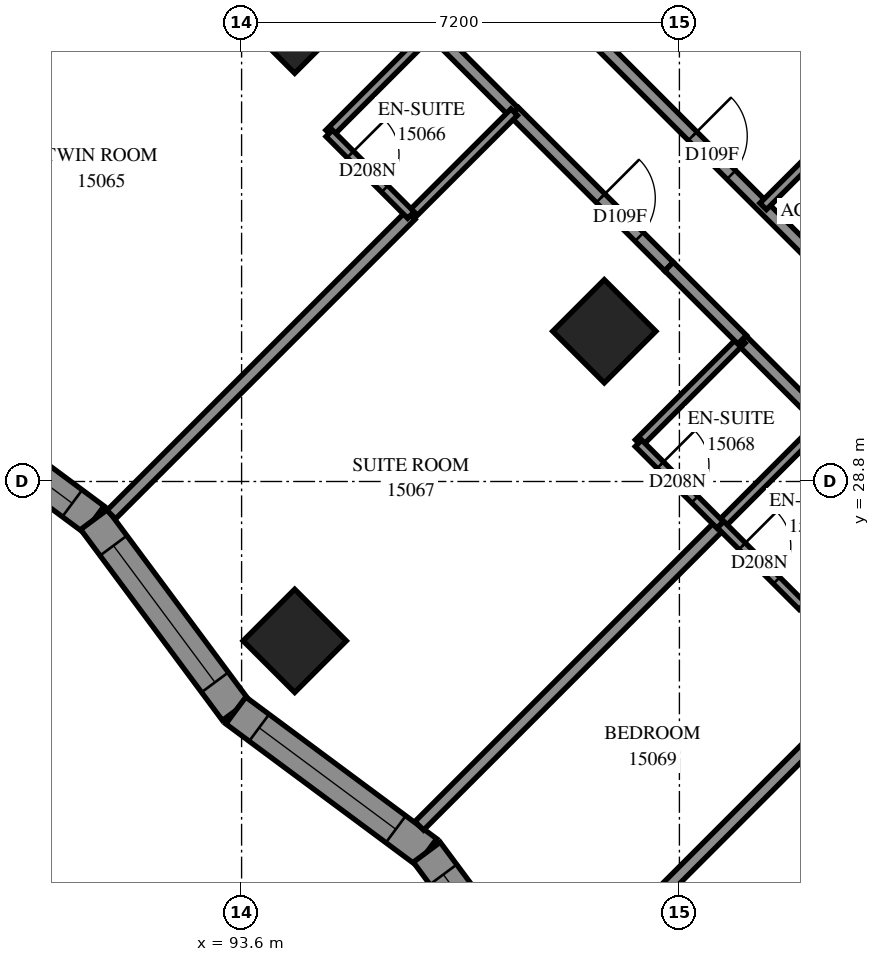
"""IFC4 building model, lengths in metres.
Left out: names, types, materials, properties, quantities, classifications, styles, units other than length and angle.
Written with IfcOpenShell. Run it as: python <this file> out.ifc"""

import sys

from ifc_helpers import new_model, si_unit, direction, frame, frame_2d, origin, origin_2d, place, context, subcontext, project, spatial, polyline, rectangle, outline, extrude, element, fill, save


model = new_model("IFC4")
c1 = context("Model", 3, precision=1e-05, world=origin(), true_north=direction((0.0, 1.0)))
c2 = subcontext(c1, "Body", "Model", "MODEL_VIEW")
j1 = project(units=[si_unit("LENGTHUNIT", "METRE"), si_unit("PLANEANGLEUNIT", "RADIAN")], contexts=[c1])
p1 = place(None, origin())
s1 = spatial("IfcSite", under=j1, at=p1, CompositionType="ELEMENT")
p2 = place(p1, origin())
s2 = spatial("IfcBuilding", under=s1, at=p2, CompositionType="ELEMENT")
p3 = place(p2, frame((0.0, 0.0, 57.6)))
s3 = spatial("IfcBuildingStorey", under=s2, at=p3, CompositionType="ELEMENT", Elevation=57.6)
for number, where, z_axis, x_axis in (
    (1, (94.474, 36.362, 0.0), (0.0, 0.0, 1.0), (0.707, -0.707, 0.0)),
    (2, (99.565, 31.271, 0.0), (0.0, 0.0, 1.0), (0.707, -0.707, 0.0)),
    (3, (94.474, 26.18, 0.0), (0.0, 0.0, 1.0), (0.707, -0.707, 0.0)),
):
    element("IfcColumn", number, at=place(p3, frame(where, z_axis=z_axis, x_axis=x_axis)), inside=s3, PredefinedType="COLUMN", context=c2, shape_type="SweptSolid", body=[
        extrude(rectangle(XDim=1.2, YDim=1.2, at=origin_2d()), origin(), (0.0, 0.0, 1.0), 3.1),
    ])
p4 = place(p3, frame((88.034, 30.506, 0.0), z_axis=(0.0, 0.0, 1.0), x_axis=(0.8029298561, -0.5960735241, 0.0)))
e4 = element("IfcWall", 4, at=p4, inside=s3, PredefinedType="SOLIDWALL", context=c2, shape_type="SweptSolid", body=[
    extrude(outline(polyline([(-0.041, -0.275), (3.87, -0.275), (3.951, 0.275), (0.041, 0.275), (-0.041, -0.275)])), origin(), (0.0, 0.0, 1.0), 3.1),
])
p5 = place(p4, frame((0.664, 0.0, 0.5)))
e5 = element("IfcOpeningElement", 5, at=p5, cuts=e4, PredefinedType="OPENING", context=c2, shape_type="SweptSolid", body=[
    extrude(rectangle(XDim=2.8, YDim=2.45, at=frame_2d((1.4, 1.225))), frame((0.0, 0.285, 0.0), z_axis=(0.0, -1.0, 0.0), x_axis=(1.0, 0.0, 0.0)), (0.0, 0.0, 1.0), 0.57),
])
p6 = place(p3, frame((91.174, 28.175, 0.0), z_axis=(0.0, 0.0, 1.0), x_axis=(0.5960692771, -0.8029330089, 0.0)))
e6 = element("IfcWall", 6, at=p6, inside=s3, PredefinedType="SOLIDWALL", context=c2, shape_type="SweptSolid", body=[
    extrude(outline(polyline([(0.041, -0.275), (3.951, -0.275), (3.87, 0.275), (-0.041, 0.275), (0.041, -0.275)])), origin(), (0.0, 0.0, 1.0), 3.1),
])
p7 = place(p6, frame((0.535, 0.0, 0.5)))
e7 = element("IfcOpeningElement", 7, at=p7, cuts=e6, PredefinedType="OPENING", context=c2, shape_type="SweptSolid", body=[
    extrude(rectangle(XDim=2.8, YDim=2.45, at=frame_2d((1.4, 1.225))), frame((0.0, 0.285, 0.0), z_axis=(0.0, -1.0, 0.0), x_axis=(1.0, 0.0, 0.0)), (0.0, 0.0, 1.0), 0.57),
])
p8 = place(p3, frame((93.505, 25.035, 0.0), z_axis=(0.0, 0.0, 1.0), x_axis=(0.8029298561, -0.5960735241, 0.0)))
e8 = element("IfcWall", 8, at=p8, inside=s3, PredefinedType="SOLIDWALL", context=c2, shape_type="SweptSolid", body=[
    extrude(outline(polyline([(-0.041, -0.275), (3.87, -0.275), (3.951, 0.275), (0.041, 0.275), (-0.041, -0.275)])), origin(), (0.0, 0.0, 1.0), 3.1),
])
p9 = place(p8, frame((0.477, 0.0, 0.5)))
e9 = element("IfcOpeningElement", 9, at=p9, cuts=e8, PredefinedType="OPENING", context=c2, shape_type="SweptSolid", body=[
    extrude(rectangle(XDim=2.8, YDim=2.45, at=frame_2d((1.4, 1.225))), frame((0.0, 0.285, 0.0), z_axis=(0.0, -1.0, 0.0), x_axis=(1.0, 0.0, 0.0)), (0.0, 0.0, 1.0), 0.57),
])
p10 = place(p3, frame((96.645, 22.704, 0.0), z_axis=(0.0, 0.0, 1.0), x_axis=(0.5960735241, -0.8029298561, 0.0)))
e10 = element("IfcWall", 10, at=p10, inside=s3, PredefinedType="SOLIDWALL", context=c2, shape_type="SweptSolid", body=[
    extrude(outline(polyline([(0.041, -0.275), (3.951, -0.275), (3.87, 0.275), (-0.041, 0.275), (0.041, -0.275)])), origin(), (0.0, 0.0, 1.0), 3.1),
])
p11 = place(p10, frame((0.456, 0.0, 0.7)))
e11 = element("IfcOpeningElement", 11, at=p11, cuts=e10, PredefinedType="OPENING", context=c2, shape_type="SweptSolid", body=[
    extrude(rectangle(XDim=1.8, YDim=2.2, at=frame_2d((0.9, 1.1))), frame((0.0, 0.285, 0.0), z_axis=(0.0, -1.0, 0.0), x_axis=(1.0, 0.0, 0.0)), (0.0, 0.0, 1.0), 0.57),
])
p12 = place(p3, frame((101.825, 31.125, 0.0), z_axis=(0.0, 0.0, 1.0), x_axis=(0.7071067812, -0.7071067812, 0.0)))
e12 = element("IfcWall", 12, at=p12, inside=s3, PredefinedType="PARTITIONING", context=c2, shape_type="SweptSolid", body=[
    extrude(rectangle(XDim=12.7, YDim=0.2, at=frame_2d((6.35, 0.0))), origin(), (0.0, 0.0, 1.0), 3.1),
])
p13 = place(p12, frame((3.895, 0.0, 0.0)))
e13 = element("IfcOpeningElement", 13, at=p13, cuts=e12, PredefinedType="OPENING", context=c2, shape_type="SweptSolid", body=[
    extrude(rectangle(XDim=0.9, YDim=2.1, at=frame_2d((0.45, 1.05))), frame((0.0, 0.11, 0.0), z_axis=(0.0, -1.0, 0.0), x_axis=(1.0, 0.0, 0.0)), (0.0, 0.0, 1.0), 0.22),
])
p14 = place(p12, frame((9.056, 0.0, 0.0)))
e14 = element("IfcOpeningElement", 14, at=p14, cuts=e12, PredefinedType="OPENING", context=c2, shape_type="SweptSolid", body=[
    extrude(rectangle(XDim=1.0, YDim=2.1, at=frame_2d((0.5, 1.05))), frame((0.0, 0.11, 0.0), z_axis=(0.0, -1.0, 0.0), x_axis=(1.0, 0.0, 0.0)), (0.0, 0.0, 1.0), 0.22),
])
p15 = place(p3, frame((86.314, 33.285, 0.0), z_axis=(0.0, 0.0, 1.0), x_axis=(0.7069956063, 0.7072179386, 0.0)))
e15 = element("IfcWall", 15, at=p15, inside=s3, PredefinedType="PARTITIONING", context=c2, shape_type="SweptSolid", body=[
    extrude(rectangle(XDim=9.445, YDim=0.2, at=frame_2d((4.723, 0.0))), origin(), (0.0, 0.0, 1.0), 3.1),
])
p16 = place(p3, frame((92.349, 40.601, 0.0), z_axis=(0.0, 0.0, 1.0), x_axis=(0.7071067812, -0.7071067812, 0.0)))
e16 = element("IfcWall", 16, at=p16, inside=s3, PredefinedType="PARTITIONING", context=c2, shape_type="SweptSolid", body=[
    extrude(rectangle(XDim=8.101, YDim=0.2, at=frame_2d((4.05, 0.0))), origin(), (0.0, 0.0, 1.0), 3.1),
])
p17 = place(p16, frame((2.909, 0.0, 0.0)))
e17 = element("IfcOpeningElement", 17, at=p17, cuts=e16, PredefinedType="OPENING", context=c2, shape_type="SweptSolid", body=[
    extrude(rectangle(XDim=0.9, YDim=2.1, at=frame_2d((0.45, 1.05))), frame((0.0, 0.11, 0.0), z_axis=(0.0, -1.0, 0.0), x_axis=(1.0, 0.0, 0.0)), (0.0, 0.0, 1.0), 0.22),
])
p18 = place(p3, frame((86.836, 35.372, 0.0), z_axis=(0.0, 0.0, 1.0), x_axis=(0.7071067812, 0.7071067812, 0.0)))
e18 = element("IfcWall", 18, at=p18, inside=s3, PredefinedType="PARTITIONING", context=c2, shape_type="SweptSolid", body=[
    extrude(rectangle(XDim=7.6, YDim=0.2, at=frame_2d((3.8, 0.0))), origin(), (0.0, 0.0, 1.0), 3.1),
])
p19 = place(p18, frame((6.342, 0.0, 0.0)))
e19 = element("IfcOpeningElement", 19, at=p19, cuts=e18, PredefinedType="OPENING", context=c2, shape_type="SweptSolid", body=[
    extrude(rectangle(XDim=1.0, YDim=2.1, at=frame_2d((0.5, 1.05))), frame((0.0, 0.11, 0.0), z_axis=(0.0, -1.0, 0.0), x_axis=(1.0, 0.0, 0.0)), (0.0, 0.0, 1.0), 0.22),
])
p20 = place(p3, frame((99.349, 36.147, 0.0), z_axis=(0.0, 0.0, 1.0), x_axis=(0.7071067812, -0.7071067812, 0.0)))
e20 = element("IfcWall", 20, at=p20, inside=s3, PredefinedType="PARTITIONING", context=c2, shape_type="SweptSolid", body=[
    extrude(rectangle(XDim=7.201, YDim=0.2, at=frame_2d((3.601, 0.0))), origin(), (0.0, 0.0, 1.0), 3.1),
])
p21 = place(p20, frame((2.358, 0.0, 0.0)))
e21 = element("IfcOpeningElement", 21, at=p21, cuts=e20, PredefinedType="OPENING", context=c2, shape_type="SweptSolid", body=[
    extrude(rectangle(XDim=0.9, YDim=2.1, at=frame_2d((0.45, 1.05))), frame((0.0, 0.11, 0.0), z_axis=(0.0, -1.0, 0.0), x_axis=(1.0, 0.0, 0.0)), (0.0, 0.0, 1.0), 0.22),
])
p22 = place(p3, frame((96.522, 23.138, 0.0), z_axis=(0.0, 0.0, 1.0), x_axis=(0.707113922, 0.7070996403, 0.0)))
e22 = element("IfcWall", 22, at=p22, inside=s3, PredefinedType="PARTITIONING", context=c2, shape_type="SweptSolid", body=[
    extrude(rectangle(XDim=7.002, YDim=0.2, at=frame_2d((3.501, 0.0))), origin(), (0.0, 0.0, 1.0), 3.1),
])
p23 = place(p3, frame((91.457, 28.256, 0.0), z_axis=(0.0, 0.0, 1.0), x_axis=(0.7071067812, 0.7071067812, 0.0)))
e23 = element("IfcWall", 23, at=p23, inside=s3, PredefinedType="PARTITIONING", context=c2, shape_type="SweptSolid", body=[
    extrude(rectangle(XDim=6.965, YDim=0.2, at=frame_2d((3.482, 0.0))), origin(), (0.0, 0.0, 1.0), 3.1),
])
p24 = place(p3, frame((100.163, 21.689, 0.0), z_axis=(0.0, 0.0, 1.0), x_axis=(0.7071067812, 0.7071067812, 0.0)))
e24 = element("IfcWall", 24, at=p24, inside=s3, PredefinedType="PARTITIONING", context=c2, shape_type="SweptSolid", body=[
    extrude(rectangle(XDim=5.504, YDim=0.2, at=frame_2d((2.752, 0.0))), origin(), (0.0, 0.0, 1.0), 3.1),
])
p25 = place(p3, frame((98.082, 34.879, 0.0), z_axis=(0.0, 0.0, 1.0), x_axis=(0.7073845681, -0.7068288851, 0.0)))
e25 = element("IfcWall", 25, at=p25, inside=s3, PredefinedType="PARTITIONING", context=c2, shape_type="SweptSolid", body=[
    extrude(rectangle(XDim=3.599, YDim=0.2, at=frame_2d((1.8, 0.0))), origin(), (0.0, 0.0, 1.0), 3.1),
])
p26 = place(p25, frame((2.009, 0.0, 0.0)))
e26 = element("IfcOpeningElement", 26, at=p26, cuts=e25, PredefinedType="OPENING", context=c2, shape_type="SweptSolid", body=[
    extrude(rectangle(XDim=0.9, YDim=2.1, at=frame_2d((0.45, 1.05))), frame((0.0, 0.11, 0.0), z_axis=(0.0, -1.0, 0.0), x_axis=(1.0, 0.0, 0.0)), (0.0, 0.0, 1.0), 0.22),
])
p27 = place(p3, frame((100.129, 29.433, 0.0), z_axis=(0.0, 0.0, 1.0), x_axis=(0.7071067812, 0.7071067812, 0.0)))
e27 = element("IfcWall", 27, at=p27, inside=s3, PredefinedType="PARTITIONING", context=c2, shape_type="SweptSolid", body=[
    extrude(rectangle(XDim=2.401, YDim=0.15, at=frame_2d((1.201, 0.0))), origin(), (0.0, 0.0, 1.0), 3.1),
])
for number, where, z_axis, x_axis in (
    (28, (96.384, 33.178, 0.0), (0.0, 0.0, 1.0), (0.708, 0.707, 0.0)),
    (29, (101.477, 28.085, 0.0), (0.0, 0.0, 1.0), (0.707, 0.708, 0.0)),
    (30, (102.177, 33.325, 0.0), (0.0, 0.0, 1.0), (0.708, 0.707, 0.0)),
):
    element("IfcWall", number, at=place(p3, frame(where, z_axis=z_axis, x_axis=x_axis)), inside=s3, PredefinedType="PARTITIONING", context=c2, shape_type="SweptSolid", body=[
        extrude(rectangle(XDim=2.4, YDim=0.15, at=frame_2d((1.2, 0.0))), origin(), (0.0, 0.0, 1.0), 3.1),
    ])
for number, where, z_axis, x_axis in (
    (31, (95.039, 34.525, 0.0), (0.0, 0.0, 1.0), (0.707, 0.707, 0.0)),
    (32, (102.817, 26.747, 0.0), (0.0, 0.0, 1.0), (0.707, 0.707, 0.0)),
):
    element("IfcWall", number, at=place(p3, frame(where, z_axis=z_axis, x_axis=x_axis)), inside=s3, PredefinedType="PARTITIONING", context=c2, shape_type="SweptSolid", body=[
        extrude(rectangle(XDim=2.398, YDim=0.15, at=frame_2d((1.199, 0.0))), origin(), (0.0, 0.0, 1.0), 3.1),
    ])
p28 = place(p3, frame((100.127, 29.429, 0.0), z_axis=(0.0, 0.0, 1.0), x_axis=(0.7071067812, -0.7071067812, 0.0)))
e33 = element("IfcWall", 33, at=p28, inside=s3, PredefinedType="PARTITIONING", context=c2, shape_type="SweptSolid", body=[
    extrude(rectangle(XDim=1.901, YDim=0.15, at=frame_2d((0.95, 0.0))), origin(), (0.0, 0.0, 1.0), 3.1),
])
p29 = place(p28, frame((0.508, 0.0, 0.0)))
e34 = element("IfcOpeningElement", 34, at=p29, cuts=e33, PredefinedType="OPENING", context=c2, shape_type="SweptSolid", body=[
    extrude(rectangle(XDim=0.8, YDim=2.1, at=frame_2d((0.4, 1.05))), frame((0.0, 0.085, 0.0), z_axis=(0.0, -1.0, 0.0), x_axis=(1.0, 0.0, 0.0)), (0.0, 0.0, 1.0), 0.17),
])
p30 = place(p3, frame((95.042, 34.526, 0.0), z_axis=(0.0, 0.0, 1.0), x_axis=(0.7065800724, -0.7076330979, 0.0)))
e35 = element("IfcWall", 35, at=p30, inside=s3, PredefinedType="PARTITIONING", context=c2, shape_type="SweptSolid", body=[
    extrude(rectangle(XDim=1.899, YDim=0.15, at=frame_2d((0.95, 0.0))), origin(), (0.0, 0.0, 1.0), 3.1),
])
p31 = place(p30, frame((0.491, 0.0, 0.0)))
e36 = element("IfcOpeningElement", 36, at=p31, cuts=e35, PredefinedType="OPENING", context=c2, shape_type="SweptSolid", body=[
    extrude(rectangle(XDim=0.8, YDim=2.1, at=frame_2d((0.4, 1.05))), frame((0.0, 0.085, 0.0), z_axis=(0.0, -1.0, 0.0), x_axis=(1.0, 0.0, 0.0)), (0.0, 0.0, 1.0), 0.17),
])
p32 = place(p3, frame((101.477, 28.091, 0.0), z_axis=(0.0, 0.0, 1.0), x_axis=(0.7076330979, -0.7065800724, 0.0)))
e37 = element("IfcWall", 37, at=p32, inside=s3, PredefinedType="PARTITIONING", context=c2, shape_type="SweptSolid", body=[
    extrude(rectangle(XDim=1.899, YDim=0.15, at=frame_2d((0.95, 0.0))), origin(), (0.0, 0.0, 1.0), 3.1),
])
p33 = place(p32, frame((0.501, 0.0, 0.0)))
e38 = element("IfcOpeningElement", 38, at=p33, cuts=e37, PredefinedType="OPENING", context=c2, shape_type="SweptSolid", body=[
    extrude(rectangle(XDim=0.8, YDim=2.1, at=frame_2d((0.4, 1.05))), frame((0.0, 0.085, 0.0), z_axis=(0.0, -1.0, 0.0), x_axis=(1.0, 0.0, 0.0)), (0.0, 0.0, 1.0), 0.17),
])
p34 = place(p3, frame((100.629, 32.335, 0.0), z_axis=(0.0, 0.0, 1.0), x_axis=(0.7071067812, -0.7071067812, 0.0)))
e39 = element("IfcWall", 39, at=p34, inside=s3, PredefinedType="PARTITIONING", context=c2, shape_type="SweptSolid", body=[
    extrude(rectangle(XDim=1.7, YDim=0.2, at=frame_2d((0.85, 0.0))), origin(), (0.0, 0.0, 1.0), 3.1),
])
p35 = place(p5, origin())
e40 = element("IfcWindow", 40, at=p35, inside=s3, PartitioningType="SINGLE_PANEL", PredefinedType="WINDOW", context=c2, shape_type="SweptSolid", body=[
    extrude(rectangle(XDim=2.8, YDim=2.45, at=frame_2d((1.4, 1.225))), frame((0.0, 0.155, 0.0), z_axis=(0.0, -1.0, 0.0), x_axis=(1.0, 0.0, 0.0)), (0.0, 0.0, 1.0), 0.06),
])
fill(e5, e40)
p36 = place(p7, origin())
e41 = element("IfcWindow", 41, at=p36, inside=s3, PartitioningType="SINGLE_PANEL", PredefinedType="WINDOW", context=c2, shape_type="SweptSolid", body=[
    extrude(rectangle(XDim=2.8, YDim=2.45, at=frame_2d((1.4, 1.225))), frame((0.0, 0.155, 0.0), z_axis=(0.0, -1.0, 0.0), x_axis=(1.0, 0.0, 0.0)), (0.0, 0.0, 1.0), 0.06),
])
fill(e7, e41)
p37 = place(p9, origin())
e42 = element("IfcWindow", 42, at=p37, inside=s3, PartitioningType="SINGLE_PANEL", PredefinedType="WINDOW", context=c2, shape_type="SweptSolid", body=[
    extrude(rectangle(XDim=2.8, YDim=2.45, at=frame_2d((1.4, 1.225))), frame((0.0, 0.155, 0.0), z_axis=(0.0, -1.0, 0.0), x_axis=(1.0, 0.0, 0.0)), (0.0, 0.0, 1.0), 0.06),
])
fill(e9, e42)
p38 = place(p21, origin())
e43 = element("IfcDoor", 43, at=p38, inside=s3, OperationType="SINGLE_SWING_RIGHT", PredefinedType="DOOR", context=c2, shape_type="SweptSolid", body=[
    extrude(rectangle(XDim=0.9, YDim=2.1, at=frame_2d((0.45, 1.05))), frame((0.0, 0.025, 0.0), z_axis=(0.0, -1.0, 0.0), x_axis=(1.0, 0.0, 0.0)), (0.0, 0.0, 1.0), 0.05),
])
fill(e21, e43)
p39 = place(p31, origin())
e44 = element("IfcDoor", 44, at=p39, inside=s3, OperationType="SINGLE_SWING_RIGHT", PredefinedType="DOOR", context=c2, shape_type="SweptSolid", body=[
    extrude(rectangle(XDim=0.8, YDim=2.1, at=frame_2d((0.4, 1.05))), frame((0.0, 0.025, 0.0), z_axis=(0.0, -1.0, 0.0), x_axis=(1.0, 0.0, 0.0)), (0.0, 0.0, 1.0), 0.05),
])
fill(e36, e44)
p40 = place(p26, origin())
e45 = element("IfcDoor", 45, at=p40, inside=s3, OperationType="SINGLE_SWING_LEFT", PredefinedType="DOOR", context=c2, shape_type="SweptSolid", body=[
    extrude(rectangle(XDim=0.9, YDim=2.1, at=frame_2d((0.45, 1.05))), frame((0.0, 0.025, 0.0), z_axis=(0.0, -1.0, 0.0), x_axis=(1.0, 0.0, 0.0)), (0.0, 0.0, 1.0), 0.05),
])
fill(e26, e45)
p41 = place(p29, origin())
e46 = element("IfcDoor", 46, at=p41, inside=s3, OperationType="SINGLE_SWING_RIGHT", PredefinedType="DOOR", context=c2, shape_type="SweptSolid", body=[
    extrude(rectangle(XDim=0.8, YDim=2.1, at=frame_2d((0.4, 1.05))), frame((0.0, 0.025, 0.0), z_axis=(0.0, -1.0, 0.0), x_axis=(1.0, 0.0, 0.0)), (0.0, 0.0, 1.0), 0.05),
])
fill(e34, e46)
p42 = place(p33, origin())
e47 = element("IfcDoor", 47, at=p42, inside=s3, OperationType="SINGLE_SWING_RIGHT", PredefinedType="DOOR", context=c2, shape_type="SweptSolid", body=[
    extrude(rectangle(XDim=0.8, YDim=2.1, at=frame_2d((0.4, 1.05))), frame((0.0, 0.025, 0.0), z_axis=(0.0, -1.0, 0.0), x_axis=(1.0, 0.0, 0.0)), (0.0, 0.0, 1.0), 0.05),
])
fill(e38, e47)
p43 = place(p11, origin())
e48 = element("IfcWindow", 48, at=p43, inside=s3, PartitioningType="SINGLE_PANEL", PredefinedType="WINDOW", context=c2, shape_type="SweptSolid", body=[
    extrude(rectangle(XDim=1.8, YDim=2.2, at=frame_2d((0.9, 1.1))), frame((0.0, 0.155, 0.0), z_axis=(0.0, -1.0, 0.0), x_axis=(1.0, 0.0, 0.0)), (0.0, 0.0, 1.0), 0.06),
])
fill(e11, e48)
save(model, sys.argv[1])
